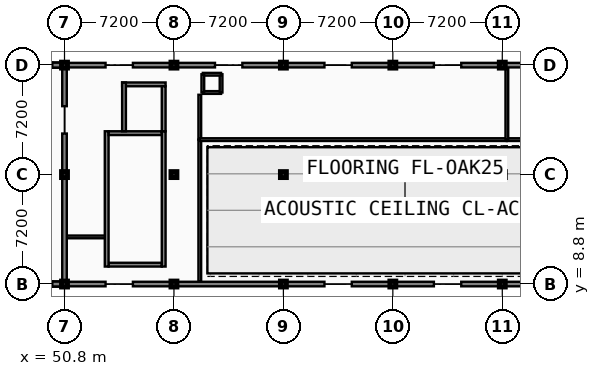
"""IFC4 building model, lengths in metres.
Left out: names, types, materials, properties, quantities, classifications, styles, units other than length and angle.
Written with IfcOpenShell. Run it as: python <this file> out.ifc"""

import sys

from ifc_helpers import new_model, si_unit, direction, frame, frame_2d, origin, origin_2d, place, context, subcontext, project, spatial, rectangle, extrude, element, fill, save


model = new_model("IFC4")
c1 = context("Model", 3, precision=1e-05, world=origin(), true_north=direction((0.0, 1.0)))
c2 = subcontext(c1, "Body", "Model", "MODEL_VIEW")
j1 = project(units=[si_unit("LENGTHUNIT", "METRE"), si_unit("PLANEANGLEUNIT", "RADIAN")], contexts=[c1])
p1 = place(None, origin())
s1 = spatial("IfcSite", under=j1, at=p1, CompositionType="ELEMENT")
p2 = place(p1, origin())
s2 = spatial("IfcBuilding", under=s1, at=p2, CompositionType="ELEMENT")
p3 = place(p2, frame((0.0, 0.0, 5.4)))
s3 = spatial("IfcBuildingStorey", under=s2, at=p3, CompositionType="ELEMENT", Elevation=5.4)
for number, where, z_axis, x_axis in (
    (1, (50.8, 8.8, 0.0), (0.0, 0.0, 1.0), (1.0, 0.0, 0.0)),
    (2, (50.8, 16.0, 0.0), (0.0, 0.0, 1.0), (1.0, 0.0, 0.0)),
    (3, (50.8, 23.2, 0.0), (0.0, 0.0, 1.0), (1.0, 0.0, 0.0)),
    (4, (58.0, 8.8, 0.0), (0.0, 0.0, 1.0), (1.0, 0.0, 0.0)),
    (5, (58.0, 16.0, 0.0), (0.0, 0.0, 1.0), (1.0, 0.0, 0.0)),
    (6, (58.0, 23.2, 0.0), (0.0, 0.0, 1.0), (1.0, 0.0, 0.0)),
    (7, (65.2, 8.8, 0.0), (0.0, 0.0, 1.0), (1.0, 0.0, 0.0)),
    (8, (65.2, 16.0, 0.0), (0.0, 0.0, 1.0), (1.0, 0.0, 0.0)),
    (9, (65.2, 23.2, 0.0), (0.0, 0.0, 1.0), (1.0, 0.0, 0.0)),
    (10, (72.4, 8.8, 0.0), (0.0, 0.0, 1.0), (1.0, 0.0, 0.0)),
    (11, (72.4, 16.0, 0.0), (0.0, 0.0, 1.0), (1.0, 0.0, 0.0)),
    (12, (72.4, 23.2, 0.0), (0.0, 0.0, 1.0), (1.0, 0.0, 0.0)),
    (13, (79.6, 8.8, 0.0), (0.0, 0.0, 1.0), (1.0, 0.0, 0.0)),
    (14, (79.6, 16.0, 0.0), (0.0, 0.0, 1.0), (1.0, 0.0, 0.0)),
    (15, (79.6, 23.2, 0.0), (0.0, 0.0, 1.0), (1.0, 0.0, 0.0)),
):
    element("IfcColumn", number, at=place(p3, frame(where, z_axis=z_axis, x_axis=x_axis)), inside=s3, PredefinedType="COLUMN", context=c2, shape_type="SweptSolid", body=[
        extrude(rectangle(XDim=0.4, YDim=0.4, at=origin_2d()), origin(), (0.0, 0.0, 1.0), 4.2),
    ])
p4 = place(p3, frame((50.94, 11.9, 0.0), z_axis=(0.0, 0.0, 1.0), x_axis=(1.0, 0.0, 0.0)))
e16 = element("IfcWall", 16, at=p4, inside=s3, PredefinedType="PARTITIONING", context=c2, shape_type="SweptSolid", body=[
    extrude(rectangle(XDim=2.66, YDim=0.18, at=frame_2d((1.33, 0.0))), origin(), (0.0, 0.0, 1.0), 3.21),
])
p5 = place(p4, frame((0.83, 0.0, -0.01)))
e17 = element("IfcOpeningElement", 17, at=p5, cuts=e16, PredefinedType="OPENING", context=c2, shape_type="SweptSolid", body=[
    extrude(rectangle(XDim=1.0, YDim=2.16, at=frame_2d((0.5, 1.08))), frame((0.0, 0.1, 0.0), z_axis=(0.0, -1.0, 0.0), x_axis=(1.0, 0.0, 0.0)), (0.0, 0.0, 1.0), 0.2),
])
p6 = place(p3, frame((59.7, 8.96, 0.0), z_axis=(0.0, 0.0, 1.0), x_axis=(0.0, 1.0, 0.0)))
e18 = element("IfcWall", 18, at=p6, inside=s3, PredefinedType="PARTITIONING", context=c2, shape_type="SweptSolid", body=[
    extrude(rectangle(XDim=9.34, YDim=0.18, at=frame_2d((4.67, 0.0))), origin(), (0.0, 0.0, 1.0), 3.25),
])
p7 = place(p6, frame((3.87, 0.0, -0.01)))
e19 = element("IfcOpeningElement", 19, at=p7, cuts=e18, PredefinedType="OPENING", context=c2, shape_type="SweptSolid", body=[
    extrude(rectangle(XDim=1.6, YDim=2.21, at=frame_2d((0.8, 1.105))), frame((0.0, 0.1, 0.0), z_axis=(0.0, -1.0, 0.0), x_axis=(1.0, 0.0, 0.0)), (0.0, 0.0, 1.0), 0.2),
])
p8 = place(p3, frame((59.7, 18.3, 0.0), z_axis=(0.0, 0.0, 1.0), x_axis=(0.0, 1.0, 0.0)))
e20 = element("IfcWall", 20, at=p8, inside=s3, PredefinedType="PARTITIONING", context=c2, shape_type="SweptSolid", body=[
    extrude(rectangle(XDim=2.95, YDim=0.18, at=frame_2d((1.475, 0.0))), origin(), (0.0, 0.0, 1.0), 3.84),
])
p9 = place(p8, frame((0.975, 0.0, -0.01)))
e21 = element("IfcOpeningElement", 21, at=p9, cuts=e20, PredefinedType="OPENING", context=c2, shape_type="SweptSolid", body=[
    extrude(rectangle(XDim=1.0, YDim=2.16, at=frame_2d((0.5, 1.08))), frame((0.0, 0.1, 0.0), z_axis=(0.0, -1.0, 0.0), x_axis=(1.0, 0.0, 0.0)), (0.0, 0.0, 1.0), 0.2),
])
p10 = place(p3, frame((59.7, 18.3, 0.0), z_axis=(0.0, 0.0, 1.0), x_axis=(1.0, 0.0, 0.0)))
e22 = element("IfcWall", 22, at=p10, inside=s3, PredefinedType="PARTITIONING", context=c2, shape_type="SweptSolid", body=[
    extrude(rectangle(XDim=20.2, YDim=0.18, at=frame_2d((10.1, 0.0))), origin(), (0.0, 0.0, 1.0), 3.37),
])
p11 = place(p10, frame((7.68, 0.0, -0.01)))
e23 = element("IfcOpeningElement", 23, at=p11, cuts=e22, PredefinedType="OPENING", context=c2, shape_type="SweptSolid", body=[
    extrude(rectangle(XDim=1.0, YDim=2.16, at=frame_2d((0.5, 1.08))), frame((0.0, 0.1, 0.0), z_axis=(0.0, -1.0, 0.0), x_axis=(1.0, 0.0, 0.0)), (0.0, 0.0, 1.0), 0.2),
])
p12 = place(p3, frame((79.9, 18.3, 0.0), z_axis=(0.0, 0.0, 1.0), x_axis=(1.0, 0.0, 0.0)))
e24 = element("IfcWall", 24, at=p12, inside=s3, PredefinedType="PARTITIONING", context=c2, shape_type="SweptSolid", body=[
    extrude(rectangle(XDim=4.6, YDim=0.18, at=frame_2d((2.3, 0.0))), origin(), (0.0, 0.0, 1.0), 3.53),
])
p13 = place(p12, frame((1.8, 0.0, -0.01)))
e25 = element("IfcOpeningElement", 25, at=p13, cuts=e24, PredefinedType="OPENING", context=c2, shape_type="SweptSolid", body=[
    extrude(rectangle(XDim=1.0, YDim=2.16, at=frame_2d((0.5, 1.08))), frame((0.0, 0.1, 0.0), z_axis=(0.0, -1.0, 0.0), x_axis=(1.0, 0.0, 0.0)), (0.0, 0.0, 1.0), 0.2),
])
p14 = place(p3, frame((79.9, 18.3, 0.0), z_axis=(0.0, 0.0, 1.0), x_axis=(0.0, 1.0, 0.0)))
e26 = element("IfcWall", 26, at=p14, inside=s3, PredefinedType="PARTITIONING", context=c2, shape_type="SweptSolid", body=[
    extrude(rectangle(XDim=4.76, YDim=0.18, at=frame_2d((2.38, 0.0))), origin(), (0.0, 0.0, 1.0), 3.52),
])
for number, where, z_axis, x_axis in (
    (27, (50.8, 8.8, 0.0), (0.0, 0.0, 1.0), (1.0, 0.0, 0.0)),
    (28, (55.3, 8.8, 0.0), (0.0, 0.0, 1.0), (1.0, 0.0, 0.0)),
):
    element("IfcWall", number, at=place(p3, frame(where, z_axis=z_axis, x_axis=x_axis)), inside=s3, PredefinedType="SOLIDWALL", context=c2, shape_type="SweptSolid", body=[
        extrude(rectangle(XDim=2.7, YDim=0.3, at=frame_2d((1.35, 0.0))), origin(), (0.0, 0.0, 1.0), 3.21),
    ])
p15 = place(p3, frame((58.0, 8.8, 0.0), z_axis=(0.0, 0.0, 1.0), x_axis=(1.0, 0.0, 0.0)))
e29 = element("IfcWall", 29, at=p15, inside=s3, PredefinedType="SOLIDWALL", context=c2, shape_type="SweptSolid", body=[
    extrude(rectangle(XDim=7.2, YDim=0.3, at=frame_2d((3.6, 0.0))), origin(), (0.0, 0.0, 1.0), 3.37),
])
p16 = place(p15, frame((0.46, 0.0, 0.85)))
e30 = element("IfcOpeningElement", 30, at=p16, cuts=e29, PredefinedType="OPENING", context=c2, shape_type="SweptSolid", body=[
    extrude(rectangle(XDim=0.9, YDim=2.15, at=frame_2d((0.45, 1.075))), frame((0.0, 0.16, 0.0), z_axis=(0.0, -1.0, 0.0), x_axis=(1.0, 0.0, 0.0)), (0.0, 0.0, 1.0), 0.32),
])
p17 = place(p15, frame((5.66, 0.0, 0.85)))
e31 = element("IfcOpeningElement", 31, at=p17, cuts=e29, PredefinedType="OPENING", context=c2, shape_type="SweptSolid", body=[
    extrude(rectangle(XDim=0.9, YDim=2.15, at=frame_2d((0.45, 1.075))), frame((0.0, 0.16, 0.0), z_axis=(0.0, -1.0, 0.0), x_axis=(1.0, 0.0, 0.0)), (0.0, 0.0, 1.0), 0.32),
])
for number, where, z_axis, x_axis in (
    (32, (65.2, 8.8, 0.0), (0.0, 0.0, 1.0), (1.0, 0.0, 0.0)),
    (33, (69.7, 8.8, 0.0), (0.0, 0.0, 1.0), (1.0, 0.0, 0.0)),
):
    element("IfcWall", number, at=place(p3, frame(where, z_axis=z_axis, x_axis=x_axis)), inside=s3, PredefinedType="SOLIDWALL", context=c2, shape_type="SweptSolid", body=[
        extrude(rectangle(XDim=2.7, YDim=0.3, at=frame_2d((1.35, 0.0))), origin(), (0.0, 0.0, 1.0), 3.37),
    ])
for number, where, z_axis, x_axis in (
    (34, (72.4, 8.8, 0.0), (0.0, 0.0, 1.0), (1.0, 0.0, 0.0)),
    (35, (76.9, 8.8, 0.0), (0.0, 0.0, 1.0), (1.0, 0.0, 0.0)),
):
    element("IfcWall", number, at=place(p3, frame(where, z_axis=z_axis, x_axis=x_axis)), inside=s3, PredefinedType="SOLIDWALL", context=c2, shape_type="SweptSolid", body=[
        extrude(rectangle(XDim=2.7, YDim=0.3, at=frame_2d((1.35, 0.0))), origin(), (0.0, 0.0, 1.0), 3.37),
    ])
for number, where, z_axis, x_axis in (
    (36, (79.6, 8.8, 0.0), (0.0, 0.0, 1.0), (1.0, 0.0, 0.0)),
    (37, (58.0, 23.2, 0.0), (0.0, 0.0, 1.0), (-1.0, 0.0, 0.0)),
    (38, (53.5, 23.2, 0.0), (0.0, 0.0, 1.0), (-1.0, 0.0, 0.0)),
):
    element("IfcWall", number, at=place(p3, frame(where, z_axis=z_axis, x_axis=x_axis)), inside=s3, PredefinedType="SOLIDWALL", context=c2, shape_type="SweptSolid", body=[
        extrude(rectangle(XDim=2.7, YDim=0.3, at=frame_2d((1.35, 0.0))), origin(), (0.0, 0.0, 1.0), 3.21),
    ])
for number, where, z_axis, x_axis in (
    (39, (65.2, 23.2, 0.0), (0.0, 0.0, 1.0), (-1.0, 0.0, 0.0)),
    (40, (60.7, 23.2, 0.0), (0.0, 0.0, 1.0), (-1.0, 0.0, 0.0)),
    (41, (72.4, 23.2, 0.0), (0.0, 0.0, 1.0), (-1.0, 0.0, 0.0)),
    (42, (67.9, 23.2, 0.0), (0.0, 0.0, 1.0), (-1.0, 0.0, 0.0)),
):
    element("IfcWall", number, at=place(p3, frame(where, z_axis=z_axis, x_axis=x_axis)), inside=s3, PredefinedType="SOLIDWALL", context=c2, shape_type="SweptSolid", body=[
        extrude(rectangle(XDim=2.7, YDim=0.3, at=frame_2d((1.35, 0.0))), origin(), (0.0, 0.0, 1.0), 3.37),
    ])
for number, where, z_axis, x_axis in (
    (43, (79.6, 23.2, 0.0), (0.0, 0.0, 1.0), (-1.0, 0.0, 0.0)),
    (44, (75.1, 23.2, 0.0), (0.0, 0.0, 1.0), (-1.0, 0.0, 0.0)),
):
    element("IfcWall", number, at=place(p3, frame(where, z_axis=z_axis, x_axis=x_axis)), inside=s3, PredefinedType="SOLIDWALL", context=c2, shape_type="SweptSolid", body=[
        extrude(rectangle(XDim=2.7, YDim=0.3, at=frame_2d((1.35, 0.0))), origin(), (0.0, 0.0, 1.0), 3.37),
    ])
p18 = place(p3, frame((86.8, 23.2, 0.0), z_axis=(0.0, 0.0, 1.0), x_axis=(-1.0, 0.0, 0.0)))
e45 = element("IfcWall", 45, at=p18, inside=s3, PredefinedType="SOLIDWALL", context=c2, shape_type="SweptSolid", body=[
    extrude(rectangle(XDim=7.2, YDim=0.3, at=frame_2d((3.6, 0.0))), origin(), (0.0, 0.0, 1.0), 3.21),
])
p19 = place(p18, frame((0.46, 0.0, 0.85)))
e46 = element("IfcOpeningElement", 46, at=p19, cuts=e45, PredefinedType="OPENING", context=c2, shape_type="SweptSolid", body=[
    extrude(rectangle(XDim=0.9, YDim=2.15, at=frame_2d((0.45, 1.075))), frame((0.0, 0.16, 0.0), z_axis=(0.0, -1.0, 0.0), x_axis=(1.0, 0.0, 0.0)), (0.0, 0.0, 1.0), 0.32),
])
p20 = place(p18, frame((5.66, 0.0, 0.85)))
e47 = element("IfcOpeningElement", 47, at=p20, cuts=e45, PredefinedType="OPENING", context=c2, shape_type="SweptSolid", body=[
    extrude(rectangle(XDim=0.9, YDim=2.15, at=frame_2d((0.45, 1.075))), frame((0.0, 0.16, 0.0), z_axis=(0.0, -1.0, 0.0), x_axis=(1.0, 0.0, 0.0)), (0.0, 0.0, 1.0), 0.32),
])
p21 = place(p3, frame((50.8, 16.0, 0.0), z_axis=(0.0, 0.0, 1.0), x_axis=(0.0, -1.0, 0.0)))
e48 = element("IfcWall", 48, at=p21, inside=s3, PredefinedType="SOLIDWALL", context=c2, shape_type="SweptSolid", body=[
    extrude(rectangle(XDim=7.2, YDim=0.3, at=frame_2d((3.6, 0.0))), origin(), (0.0, 0.0, 1.0), 3.21),
])
p22 = place(p21, frame((3.0, 0.0, -0.01)))
e49 = element("IfcOpeningElement", 49, at=p22, cuts=e48, PredefinedType="OPENING", context=c2, shape_type="SweptSolid", body=[
    extrude(rectangle(XDim=1.2, YDim=2.21, at=frame_2d((0.6, 1.105))), frame((0.0, 0.16, 0.0), z_axis=(0.0, -1.0, 0.0), x_axis=(1.0, 0.0, 0.0)), (0.0, 0.0, 1.0), 0.32),
])
for number, where, z_axis, x_axis in (
    (50, (50.8, 23.2, 0.0), (0.0, 0.0, 1.0), (0.0, -1.0, 0.0)),
    (51, (50.8, 18.7, 0.0), (0.0, 0.0, 1.0), (0.0, -1.0, 0.0)),
):
    element("IfcWall", number, at=place(p3, frame(where, z_axis=z_axis, x_axis=x_axis)), inside=s3, PredefinedType="SOLIDWALL", context=c2, shape_type="SweptSolid", body=[
        extrude(rectangle(XDim=2.7, YDim=0.3, at=frame_2d((1.35, 0.0))), origin(), (0.0, 0.0, 1.0), 3.21),
    ])
p23 = place(p3, frame((49.65, 8.8, 0.0), z_axis=(0.0, 0.0, 1.0), x_axis=(1.0, 0.0, 0.0)))
e52 = element("IfcWall", 52, at=p23, inside=s3, PredefinedType="PARAPET", context=c2, shape_type="SweptSolid", body=[
    extrude(rectangle(XDim=1.15, YDim=0.32, at=frame_2d((0.575, 0.0))), origin(), (0.0, 0.0, 1.0), 3.21),
])
p24 = place(p3, frame((46.0, 8.8, 3.45), z_axis=(0.0, 0.0, 1.0), x_axis=(1.0, 0.0, 0.0)))
e53 = element("IfcWall", 53, at=p24, inside=s3, PredefinedType="PARAPET", context=c2, shape_type="SweptSolid", body=[
    extrude(rectangle(XDim=4.8, YDim=0.32, at=frame_2d((2.4, 0.0))), origin(), (0.0, 0.0, 1.0), 0.8),
])
p25 = place(p3, frame((46.0, 8.8, 4.25), z_axis=(0.0, 0.0, 1.0), x_axis=(1.0, 0.0, 0.0)))
e54 = element("IfcWall", 54, at=p25, inside=s3, PredefinedType="PARAPET", context=c2, shape_type="SweptSolid", body=[
    extrude(rectangle(XDim=4.8, YDim=0.32, at=frame_2d((2.4, 0.0))), origin(), (0.0, 0.0, 1.0), 0.6),
])
p26 = place(p3, frame((46.8, 8.8, 4.85), z_axis=(0.0, 0.0, 1.0), x_axis=(1.0, 0.0, 0.0)))
e55 = element("IfcWall", 55, at=p26, inside=s3, PredefinedType="PARAPET", context=c2, shape_type="SweptSolid", body=[
    extrude(rectangle(XDim=3.2, YDim=0.32, at=frame_2d((1.6, 0.0))), origin(), (0.0, 0.0, 1.0), 0.65),
])
p27 = place(p3, frame((49.65, 23.2, 0.0), z_axis=(0.0, 0.0, 1.0), x_axis=(1.0, 0.0, 0.0)))
e56 = element("IfcWall", 56, at=p27, inside=s3, PredefinedType="PARAPET", context=c2, shape_type="SweptSolid", body=[
    extrude(rectangle(XDim=1.15, YDim=0.32, at=frame_2d((0.575, 0.0))), origin(), (0.0, 0.0, 1.0), 3.21),
])
p28 = place(p3, frame((46.0, 23.2, 3.45), z_axis=(0.0, 0.0, 1.0), x_axis=(1.0, 0.0, 0.0)))
e57 = element("IfcWall", 57, at=p28, inside=s3, PredefinedType="PARAPET", context=c2, shape_type="SweptSolid", body=[
    extrude(rectangle(XDim=4.8, YDim=0.32, at=frame_2d((2.4, 0.0))), origin(), (0.0, 0.0, 1.0), 0.8),
])
p29 = place(p3, frame((46.0, 23.2, 4.25), z_axis=(0.0, 0.0, 1.0), x_axis=(1.0, 0.0, 0.0)))
e58 = element("IfcWall", 58, at=p29, inside=s3, PredefinedType="PARAPET", context=c2, shape_type="SweptSolid", body=[
    extrude(rectangle(XDim=4.8, YDim=0.32, at=frame_2d((2.4, 0.0))), origin(), (0.0, 0.0, 1.0), 0.6),
])
p30 = place(p3, frame((46.8, 23.2, 4.85), z_axis=(0.0, 0.0, 1.0), x_axis=(1.0, 0.0, 0.0)))
e59 = element("IfcWall", 59, at=p30, inside=s3, PredefinedType="PARAPET", context=c2, shape_type="SweptSolid", body=[
    extrude(rectangle(XDim=3.2, YDim=0.32, at=frame_2d((1.6, 0.0))), origin(), (0.0, 0.0, 1.0), 0.65),
])
p31 = place(p3, frame((53.7, 10.075, 0.0), z_axis=(0.0, 0.0, 1.0), x_axis=(1.0, 0.0, 0.0)))
e60 = element("IfcWall", 60, at=p31, inside=s3, PredefinedType="SHEAR", context=c2, shape_type="SweptSolid", body=[
    extrude(rectangle(XDim=3.5, YDim=0.25, at=frame_2d((1.75, 0.0))), origin(), (0.0, 0.0, 1.0), 4.2),
])
p32 = place(p31, frame((1.1, 0.0, -0.01)))
e61 = element("IfcOpeningElement", 61, at=p32, cuts=e60, PredefinedType="OPENING", context=c2, shape_type="SweptSolid", body=[
    extrude(rectangle(XDim=1.3, YDim=2.16, at=frame_2d((0.65, 1.08))), frame((0.0, 0.135, 0.0), z_axis=(0.0, -1.0, 0.0), x_axis=(1.0, 0.0, 0.0)), (0.0, 0.0, 1.0), 0.27),
])
p33 = place(p3, frame((53.575, 9.95, 0.0), z_axis=(0.0, 0.0, 1.0), x_axis=(0.0, 1.0, 0.0)))
e62 = element("IfcWall", 62, at=p33, inside=s3, PredefinedType="SHEAR", context=c2, shape_type="SweptSolid", body=[
    extrude(rectangle(XDim=8.9, YDim=0.25, at=frame_2d((4.45, 0.0))), origin(), (0.0, 0.0, 1.0), 4.2),
])
p34 = place(p3, frame((57.2, 18.725, 0.0), z_axis=(0.0, 0.0, 1.0), x_axis=(-1.0, 0.0, 0.0)))
e63 = element("IfcWall", 63, at=p34, inside=s3, PredefinedType="SHEAR", context=c2, shape_type="SweptSolid", body=[
    extrude(rectangle(XDim=3.5, YDim=0.25, at=frame_2d((1.75, 0.0))), origin(), (0.0, 0.0, 1.0), 4.2),
])
p35 = place(p3, frame((57.325, 9.95, 0.0), z_axis=(0.0, 0.0, 1.0), x_axis=(0.0, 1.0, 0.0)))
e64 = element("IfcWall", 64, at=p35, inside=s3, PredefinedType="SHEAR", context=c2, shape_type="SweptSolid", body=[
    extrude(rectangle(XDim=8.9, YDim=0.25, at=frame_2d((4.45, 0.0))), origin(), (0.0, 0.0, 1.0), 4.2),
])
p36 = place(p3, frame((54.59, 21.935, 0.0), z_axis=(0.0, 0.0, 1.0), x_axis=(1.0, 0.0, 0.0)))
e65 = element("IfcWall", 65, at=p36, inside=s3, PredefinedType="SHEAR", context=c2, shape_type="SweptSolid", body=[
    extrude(rectangle(XDim=2.86, YDim=0.25, at=frame_2d((1.43, 0.0))), origin(), (0.0, 0.0, 1.0), 4.2),
])
p37 = place(p3, frame((57.325, 18.85, 0.0), z_axis=(0.0, 0.0, 1.0), x_axis=(0.0, 1.0, 0.0)))
e66 = element("IfcWall", 66, at=p37, inside=s3, PredefinedType="SHEAR", context=c2, shape_type="SweptSolid", body=[
    extrude(rectangle(XDim=2.96, YDim=0.25, at=frame_2d((1.48, 0.0))), origin(), (0.0, 0.0, 1.0), 4.2),
])
p38 = place(p37, frame((0.93, 0.0, -0.01)))
e67 = element("IfcOpeningElement", 67, at=p38, cuts=e66, PredefinedType="OPENING", context=c2, shape_type="SweptSolid", body=[
    extrude(rectangle(XDim=1.1, YDim=2.16, at=frame_2d((0.55, 1.08))), frame((0.0, 0.135, 0.0), z_axis=(0.0, -1.0, 0.0), x_axis=(1.0, 0.0, 0.0)), (0.0, 0.0, 1.0), 0.27),
])
p39 = place(p3, frame((54.715, 18.85, 0.0), z_axis=(0.0, 0.0, 1.0), x_axis=(0.0, 1.0, 0.0)))
e68 = element("IfcWall", 68, at=p39, inside=s3, PredefinedType="SHEAR", context=c2, shape_type="SweptSolid", body=[
    extrude(rectangle(XDim=3.21, YDim=0.25, at=frame_2d((1.605, 0.0))), origin(), (0.0, 0.0, 1.0), 4.2),
])
for number, where, z_axis, x_axis in (
    (69, (59.9, 21.4, 0.0), (0.0, 0.0, 1.0), (1.0, 0.0, 0.0)),
    (70, (61.1, 21.4, 0.0), (0.0, 0.0, 1.0), (0.0, 1.0, 0.0)),
    (71, (61.1, 22.6, 0.0), (0.0, 0.0, 1.0), (-1.0, 0.0, 0.0)),
):
    element("IfcWall", number, at=place(p3, frame(where, z_axis=z_axis, x_axis=x_axis)), inside=s3, PredefinedType="SOLIDWALL", context=c2, shape_type="SweptSolid", body=[
        extrude(rectangle(XDim=1.2, YDim=0.18, at=frame_2d((0.6, 0.0))), origin(), (0.0, 0.0, 1.0), 3.97),
    ])
p40 = place(p3, frame((59.9, 22.6, 0.0), z_axis=(0.0, 0.0, 1.0), x_axis=(0.0, -1.0, 0.0)))
e72 = element("IfcWall", 72, at=p40, inside=s3, PredefinedType="SOLIDWALL", context=c2, shape_type="SweptSolid", body=[
    extrude(rectangle(XDim=1.2, YDim=0.18, at=frame_2d((0.6, 0.0))), origin(), (0.0, 0.0, 1.0), 3.97),
])
p41 = place(p40, frame((0.2, 0.0, -0.01)))
e73 = element("IfcOpeningElement", 73, at=p41, cuts=e72, PredefinedType="OPENING", context=c2, shape_type="SweptSolid", body=[
    extrude(rectangle(XDim=0.8, YDim=2.06, at=frame_2d((0.4, 1.03))), frame((0.0, 0.1, 0.0), z_axis=(0.0, -1.0, 0.0), x_axis=(1.0, 0.0, 0.0)), (0.0, 0.0, 1.0), 0.2),
])
p42 = place(p5, frame((1.0, 0.0, 0.01), z_axis=(0.0, 0.0, 1.0), x_axis=(-1.0, 0.0, 0.0)))
e74 = element("IfcDoor", 74, at=p42, inside=s3, OperationType="SINGLE_SWING_RIGHT", PredefinedType="DOOR", context=c2, shape_type="SweptSolid", body=[
    extrude(rectangle(XDim=1.0, YDim=2.15, at=frame_2d((0.5, 1.075))), frame((0.0, 0.025, 0.0), z_axis=(0.0, -1.0, 0.0), x_axis=(1.0, 0.0, 0.0)), (0.0, 0.0, 1.0), 0.05),
])
fill(e17, e74)
p43 = place(p7, frame((0.0, 0.0, 0.01)))
e75 = element("IfcDoor", 75, at=p43, inside=s3, OperationType="DOUBLE_SWING_LEFT", PredefinedType="DOOR", context=c2, shape_type="SweptSolid", body=[
    extrude(rectangle(XDim=1.6, YDim=2.2, at=frame_2d((0.8, 1.1))), frame((0.0, 0.025, 0.0), z_axis=(0.0, -1.0, 0.0), x_axis=(1.0, 0.0, 0.0)), (0.0, 0.0, 1.0), 0.05),
])
fill(e19, e75)
p44 = place(p9, frame((0.0, 0.0, 0.01)))
e76 = element("IfcDoor", 76, at=p44, inside=s3, OperationType="SINGLE_SWING_RIGHT", PredefinedType="DOOR", context=c2, shape_type="SweptSolid", body=[
    extrude(rectangle(XDim=1.0, YDim=2.15, at=frame_2d((0.5, 1.075))), frame((0.0, 0.025, 0.0), z_axis=(0.0, -1.0, 0.0), x_axis=(1.0, 0.0, 0.0)), (0.0, 0.0, 1.0), 0.05),
])
fill(e21, e76)
p45 = place(p11, frame((1.0, 0.0, 0.01), z_axis=(0.0, 0.0, 1.0), x_axis=(-1.0, 0.0, 0.0)))
e77 = element("IfcDoor", 77, at=p45, inside=s3, OperationType="SINGLE_SWING_LEFT", PredefinedType="DOOR", context=c2, shape_type="SweptSolid", body=[
    extrude(rectangle(XDim=1.0, YDim=2.15, at=frame_2d((0.5, 1.075))), frame((0.0, 0.025, 0.0), z_axis=(0.0, -1.0, 0.0), x_axis=(1.0, 0.0, 0.0)), (0.0, 0.0, 1.0), 0.05),
])
fill(e23, e77)
p46 = place(p16, origin())
e78 = element("IfcWindow", 78, at=p46, inside=s3, PartitioningType="SINGLE_PANEL", PredefinedType="WINDOW", context=c2, shape_type="SweptSolid", body=[
    extrude(rectangle(XDim=0.9, YDim=2.15, at=frame_2d((0.45, 1.075))), frame((0.0, 0.03, 0.0), z_axis=(0.0, -1.0, 0.0), x_axis=(1.0, 0.0, 0.0)), (0.0, 0.0, 1.0), 0.06),
])
fill(e30, e78)
p47 = place(p17, origin())
e79 = element("IfcWindow", 79, at=p47, inside=s3, PartitioningType="SINGLE_PANEL", PredefinedType="WINDOW", context=c2, shape_type="SweptSolid", body=[
    extrude(rectangle(XDim=0.9, YDim=2.15, at=frame_2d((0.45, 1.075))), frame((0.0, 0.03, 0.0), z_axis=(0.0, -1.0, 0.0), x_axis=(1.0, 0.0, 0.0)), (0.0, 0.0, 1.0), 0.06),
])
fill(e31, e79)
p48 = place(p20, origin())
e80 = element("IfcWindow", 80, at=p48, inside=s3, PartitioningType="SINGLE_PANEL", PredefinedType="WINDOW", context=c2, shape_type="SweptSolid", body=[
    extrude(rectangle(XDim=0.9, YDim=2.15, at=frame_2d((0.45, 1.075))), frame((0.0, 0.03, 0.0), z_axis=(0.0, -1.0, 0.0), x_axis=(1.0, 0.0, 0.0)), (0.0, 0.0, 1.0), 0.06),
])
fill(e47, e80)
p49 = place(p22, frame((0.0, 0.0, 0.01)))
e81 = element("IfcDoor", 81, at=p49, inside=s3, OperationType="SINGLE_SWING_RIGHT", PredefinedType="DOOR", context=c2, shape_type="SweptSolid", body=[
    extrude(rectangle(XDim=1.2, YDim=2.2, at=frame_2d((0.6, 1.1))), frame((0.0, 0.025, 0.0), z_axis=(0.0, -1.0, 0.0), x_axis=(1.0, 0.0, 0.0)), (0.0, 0.0, 1.0), 0.05),
])
fill(e49, e81)
p50 = place(p32, frame((1.3, 0.0, 0.01), z_axis=(0.0, 0.0, 1.0), x_axis=(-1.0, 0.0, 0.0)))
e82 = element("IfcDoor", 82, at=p50, inside=s3, OperationType="SINGLE_SWING_LEFT", PredefinedType="DOOR", context=c2, shape_type="SweptSolid", body=[
    extrude(rectangle(XDim=1.3, YDim=2.15, at=frame_2d((0.65, 1.075))), frame((0.0, 0.025, 0.0), z_axis=(0.0, -1.0, 0.0), x_axis=(1.0, 0.0, 0.0)), (0.0, 0.0, 1.0), 0.05),
])
fill(e61, e82)
p51 = place(p38, frame((0.0, 0.0, 0.01)))
e83 = element("IfcDoor", 83, at=p51, inside=s3, OperationType="SLIDING_TO_LEFT", PredefinedType="DOOR", context=c2, shape_type="SweptSolid", body=[
    extrude(rectangle(XDim=1.1, YDim=2.15, at=frame_2d((0.55, 1.075))), frame((0.0, 0.025, 0.0), z_axis=(0.0, -1.0, 0.0), x_axis=(1.0, 0.0, 0.0)), (0.0, 0.0, 1.0), 0.05),
])
fill(e67, e83)
p52 = place(p41, frame((0.0, 0.0, 0.01)))
e84 = element("IfcDoor", 84, at=p52, inside=s3, OperationType="SINGLE_SWING_RIGHT", PredefinedType="DOOR", context=c2, shape_type="SweptSolid", body=[
    extrude(rectangle(XDim=0.8, YDim=2.05, at=frame_2d((0.4, 1.025))), frame((0.0, 0.025, 0.0), z_axis=(0.0, -1.0, 0.0), x_axis=(1.0, 0.0, 0.0)), (0.0, 0.0, 1.0), 0.05),
])
fill(e73, e84)
save(model, sys.argv[1])
